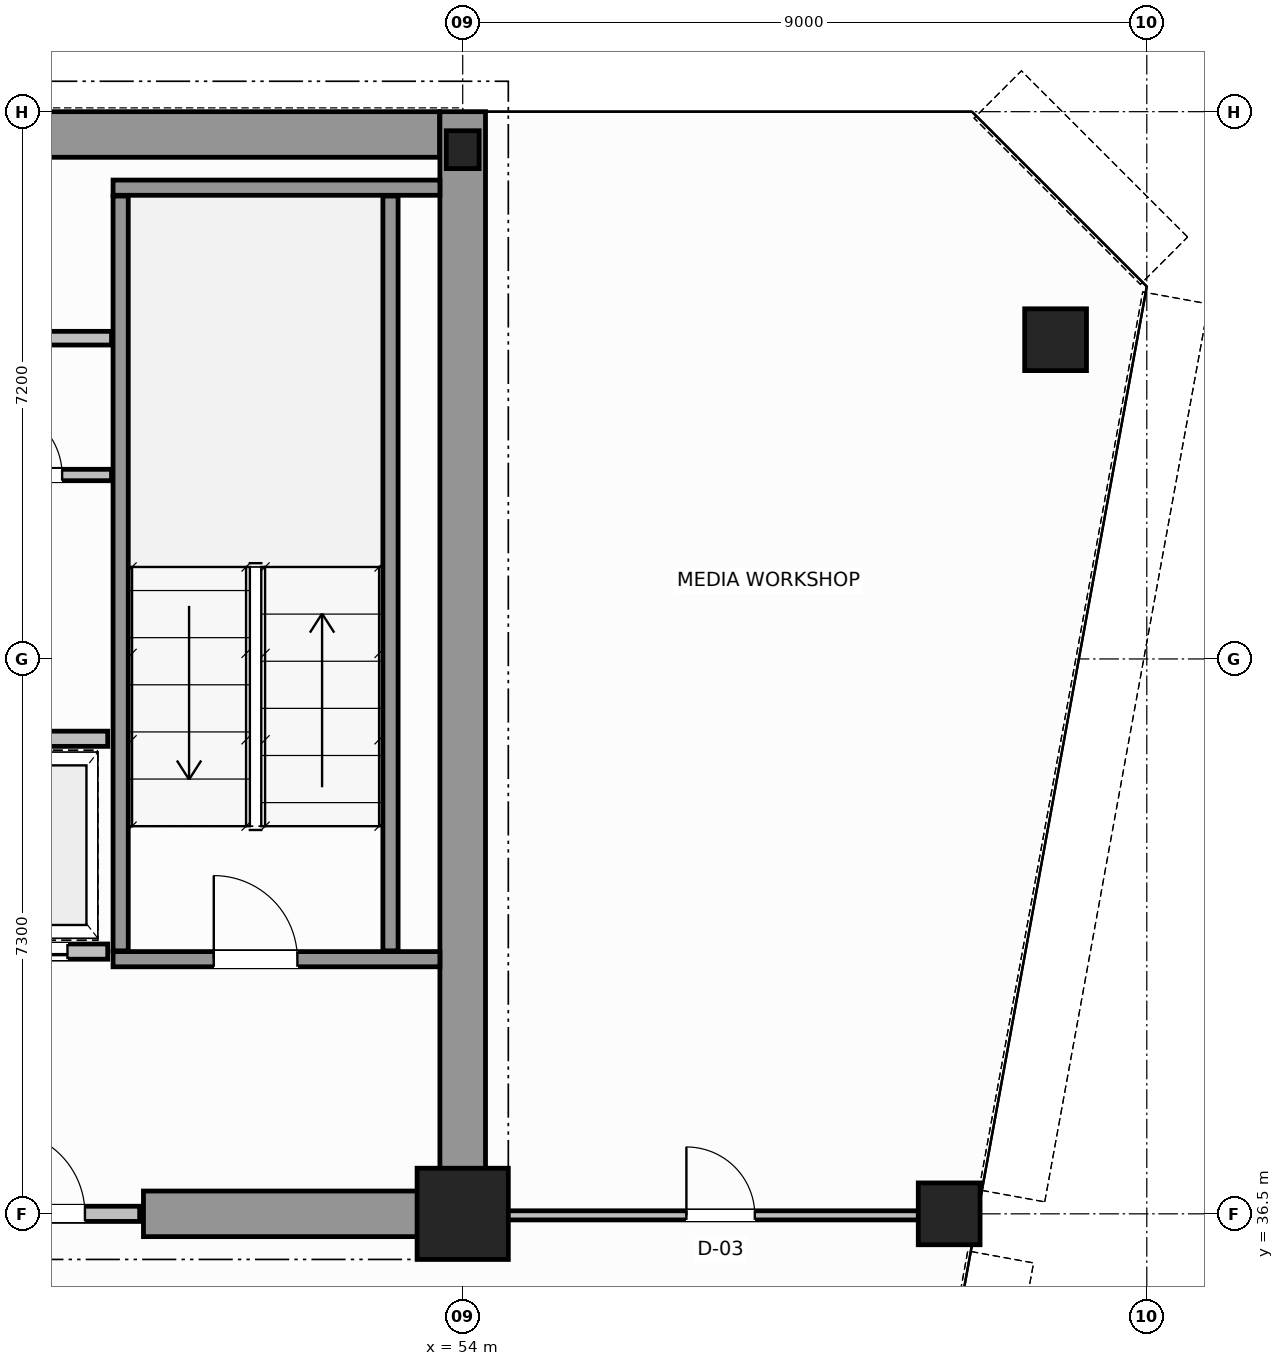
"""IFC4 building model, lengths in metres.
Left out: names, types, materials, properties, quantities, classifications, styles, units other than length and angle.
Written with IfcOpenShell. Run it as: python <this file> out.ifc"""

import sys

from ifc_helpers import new_model, si_unit, direction, frame, frame_2d, origin, origin_2d, place, context, subcontext, project, spatial, rectangle, hollow_circle, i_section, extrude, source, transform, mapped, element, fill, save


model = new_model("IFC4")
c1 = context("Model", 3, precision=1e-05, world=origin(), true_north=direction((0.0, 1.0)))
c2 = subcontext(c1, "Body", "Model", "MODEL_VIEW")
j1 = project(units=[si_unit("LENGTHUNIT", "METRE"), si_unit("PLANEANGLEUNIT", "RADIAN")], contexts=[c1])
p1 = place(None, origin())
s1 = spatial("IfcSite", under=j1, at=p1, CompositionType="ELEMENT")
p2 = place(p1, origin())
s2 = spatial("IfcBuilding", under=s1, at=p2, CompositionType="ELEMENT")
p3 = place(p2, frame((0.0, 0.0, 172.8)))
s3 = spatial("IfcBuildingStorey", under=s2, at=p3, CompositionType="ELEMENT", Elevation=172.8)
m1 = source(origin(), c2, "Body", "SweptSolid", [
    extrude(rectangle(XDim=1.2, YDim=1.2, at=origin_2d()), origin(), (0.0, 0.0, 1.0), 3.8),
])
p4 = place(p3, frame((54.0, 36.5, 0.0), z_axis=(0.0, 0.0, 1.0), x_axis=(1.0, 0.0, 0.0)))
e1 = element("IfcColumn", 1, at=p4, inside=s3, PredefinedType="COLUMN", context=c2, shape_type="MappedRepresentation", body=[
    mapped(m1, transform((0.0, 0.0, 0.0), scale=1.0)),
])
m2 = source(origin(), c2, "Body", "SweptSolid", [
    extrude(i_section(OverallWidth=0.432, OverallDepth=0.498, WebThickness=0.055, FlangeThickness=0.068, FilletRadius=0.015, at=origin_2d()), origin(), (0.0, 0.0, 1.0), 3.8),
])
p5 = place(p3, frame((54.0, 50.5, 0.0), z_axis=(0.0, 0.0, 1.0), x_axis=(1.0, 0.0, 0.0)))
e2 = element("IfcColumn", 2, at=p5, inside=s3, PredefinedType="COLUMN", context=c2, shape_type="MappedRepresentation", body=[
    mapped(m2, transform((0.0, 0.0, 0.0), scale=1.0)),
])
m3 = source(origin(), c2, "Body", "SweptSolid", [
    extrude(hollow_circle(Radius=0.406, WallThickness=0.04, at=origin_2d()), origin(), (0.0, 0.0, 1.0), 3.8),
])
for number, where, z_axis, x_axis in (
    (3, (61.8, 48.0, 0.0), (0.0, 0.0, 1.0), (1.0, 0.0, 0.0)),
    (4, (60.4, 36.5, 0.0), (0.0, 0.0, 1.0), (1.0, 0.0, 0.0)),
):
    element("IfcColumn", number, at=place(p3, frame(where, z_axis=z_axis, x_axis=x_axis)), inside=s3, PredefinedType="COLUMN", context=c2, shape_type="MappedRepresentation", body=[
        mapped(m3, transform((0.0, 0.0, 0.0), scale=1.0)),
    ])
p6 = place(p3, frame((34.002, 50.7, 0.0), z_axis=(0.0, 0.0, 1.0), x_axis=(1.0, 0.0, 0.0)))
e5 = element("IfcWall", 5, at=p6, inside=s3, PredefinedType="SHEAR", context=c2, shape_type="SweptSolid", body=[
    extrude(rectangle(XDim=19.694, YDim=0.6, at=frame_2d((9.847, 0.0))), origin(), (0.0, 0.0, 1.0), 3.8),
])
p7 = place(p3, frame((54.0, 36.5, 0.0), z_axis=(0.0, 0.0, 1.0), x_axis=(0.0, 1.0, 0.0)))
e6 = element("IfcWall", 6, at=p7, inside=s3, PredefinedType="SHEAR", context=c2, shape_type="SweptSolid", body=[
    extrude(rectangle(XDim=14.5, YDim=0.6, at=frame_2d((7.25, 0.0))), origin(), (0.0, 0.0, 1.0), 3.8),
])
p8 = place(p3, frame((49.8, 36.5, 0.0), z_axis=(0.0, 0.0, 1.0), x_axis=(1.0, 0.0, 0.0)))
e7 = element("IfcWall", 7, at=p8, inside=s3, PredefinedType="SHEAR", context=c2, shape_type="SweptSolid", body=[
    extrude(rectangle(XDim=3.88, YDim=0.6, at=frame_2d((1.94, 0.0))), origin(), (0.0, 0.0, 1.0), 2.58),
])
p9 = place(p3, frame((49.4, 39.85, 0.0), z_axis=(0.0, 0.0, 1.0), x_axis=(1.0, 0.0, 0.0)))
e8 = element("IfcWall", 8, at=p9, inside=s3, PredefinedType="SOLIDWALL", context=c2, shape_type="SweptSolid", body=[
    extrude(rectangle(XDim=4.3, YDim=0.2, at=frame_2d((2.15, 0.0))), origin(), (0.0, 0.0, 1.0), 3.8),
])
p10 = place(p9, frame((1.325, 0.0, 0.0)))
e9 = element("IfcOpeningElement", 9, at=p10, cuts=e8, PredefinedType="OPENING", context=c2, shape_type="SweptSolid", body=[
    extrude(rectangle(XDim=1.1, YDim=2.15, at=frame_2d((0.55, 1.075))), frame((0.0, 0.11, 0.0), z_axis=(0.0, -1.0, 0.0), x_axis=(1.0, 0.0, 0.0)), (0.0, 0.0, 1.0), 0.22),
])
p11 = place(p3, frame((49.4, 50.0, 0.0), z_axis=(0.0, 0.0, 1.0), x_axis=(1.0, 0.0, 0.0)))
e10 = element("IfcWall", 10, at=p11, inside=s3, PredefinedType="SOLIDWALL", context=c2, shape_type="SweptSolid", body=[
    extrude(rectangle(XDim=4.3, YDim=0.2, at=frame_2d((2.15, 0.0))), origin(), (0.0, 0.0, 1.0), 3.8),
])
for number, where, z_axis, x_axis in (
    (11, (49.5, 39.96, 0.0), (0.0, 0.0, 1.0), (0.0, 1.0, 0.0)),
    (12, (53.05, 39.96, 0.0), (0.0, 0.0, 1.0), (0.0, 1.0, 0.0)),
):
    element("IfcWall", number, at=place(p3, frame(where, z_axis=z_axis, x_axis=x_axis)), inside=s3, PredefinedType="SOLIDWALL", context=c2, shape_type="SweptSolid", body=[
        extrude(rectangle(XDim=9.93, YDim=0.2, at=frame_2d((4.965, 0.0))), origin(), (0.0, 0.0, 1.0), 3.8),
    ])
p12 = place(p3, frame((47.28, 36.5, 0.0), z_axis=(0.0, 0.0, 1.0), x_axis=(1.0, 0.0, 0.0)))
e13 = element("IfcWall", 13, at=p12, inside=s3, PredefinedType="SOLIDWALL", context=c2, shape_type="SweptSolid", body=[
    extrude(rectangle(XDim=2.47, YDim=0.2, at=frame_2d((1.235, 0.0))), origin(), (0.0, 0.0, 1.0), 2.57),
])
p13 = place(p12, frame((0.65, 0.0, 0.0)))
e14 = element("IfcOpeningElement", 14, at=p13, cuts=e13, PredefinedType="OPENING", context=c2, shape_type="SweptSolid", body=[
    extrude(rectangle(XDim=1.1, YDim=2.15, at=frame_2d((0.55, 1.075))), frame((0.0, 0.11, 0.0), z_axis=(0.0, -1.0, 0.0), x_axis=(1.0, 0.0, 0.0)), (0.0, 0.0, 1.0), 0.22),
])
p14 = place(p3, frame((47.17, 39.95, 0.0), z_axis=(0.0, 0.0, 1.0), x_axis=(1.0, 0.0, 0.0)))
e15 = element("IfcWall", 15, at=p14, inside=s3, PredefinedType="SOLIDWALL", context=c2, shape_type="SweptSolid", body=[
    extrude(rectangle(XDim=2.16, YDim=0.2, at=frame_2d((1.08, 0.0))), origin(), (0.0, 0.0, 1.0), 3.58),
])
p15 = place(p14, frame((0.53, 0.0, 0.0)))
e16 = element("IfcOpeningElement", 16, at=p15, cuts=e15, PredefinedType="OPENING", context=c2, shape_type="SweptSolid", body=[
    extrude(rectangle(XDim=1.1, YDim=2.15, at=frame_2d((0.55, 1.075))), frame((0.0, 0.11, 0.0), z_axis=(0.0, -1.0, 0.0), x_axis=(1.0, 0.0, 0.0)), (0.0, 0.0, 1.0), 0.22),
])
p16 = place(p3, frame((47.17, 42.75, 0.0), z_axis=(0.0, 0.0, 1.0), x_axis=(1.0, 0.0, 0.0)))
e17 = element("IfcWall", 17, at=p16, inside=s3, PredefinedType="SOLIDWALL", context=c2, shape_type="SweptSolid", body=[
    extrude(rectangle(XDim=2.16, YDim=0.2, at=frame_2d((1.08, 0.0))), origin(), (0.0, 0.0, 1.0), 3.58),
])
p17 = place(p3, frame((47.28, 46.22, 0.0), z_axis=(0.0, 0.0, 1.0), x_axis=(1.0, 0.0, 0.0)))
e18 = element("IfcWall", 18, at=p17, inside=s3, PredefinedType="PARTITIONING", context=c2, shape_type="SweptSolid", body=[
    extrude(rectangle(XDim=2.1, YDim=0.15, at=frame_2d((1.05, 0.0))), origin(), (0.0, 0.0, 1.0), 3.58),
])
p18 = place(p17, frame((0.55, 0.0, 0.0)))
e19 = element("IfcOpeningElement", 19, at=p18, cuts=e18, PredefinedType="OPENING", context=c2, shape_type="SweptSolid", body=[
    extrude(rectangle(XDim=0.9, YDim=2.1, at=frame_2d((0.45, 1.05))), frame((0.0, 0.085, 0.0), z_axis=(0.0, -1.0, 0.0), x_axis=(1.0, 0.0, 0.0)), (0.0, 0.0, 1.0), 0.17),
])
p19 = place(p3, frame((18.62, 48.02, 0.0), z_axis=(0.0, 0.0, 1.0), x_axis=(1.0, 0.0, 0.0)))
e20 = element("IfcWall", 20, at=p19, inside=s3, PredefinedType="PLUMBINGWALL", context=c2, shape_type="SweptSolid", body=[
    extrude(rectangle(XDim=30.76, YDim=0.18, at=frame_2d((15.38, 0.0))), origin(), (0.0, 0.0, 1.0), 3.58),
])
p20 = place(p19, frame((1.655, 0.0, 0.0)))
e21 = element("IfcOpeningElement", 21, at=p20, cuts=e20, PredefinedType="OPENING", context=c2, shape_type="SweptSolid", body=[
    extrude(rectangle(XDim=0.9, YDim=2.15, at=frame_2d((0.45, 1.075))), frame((0.0, 0.1, 0.0), z_axis=(0.0, -1.0, 0.0), x_axis=(1.0, 0.0, 0.0)), (0.0, 0.0, 1.0), 0.2),
])
p21 = place(p19, frame((6.03, 0.0, 0.0)))
e22 = element("IfcOpeningElement", 22, at=p21, cuts=e20, PredefinedType="OPENING", context=c2, shape_type="SweptSolid", body=[
    extrude(rectangle(XDim=0.9, YDim=2.15, at=frame_2d((0.45, 1.075))), frame((0.0, 0.1, 0.0), z_axis=(0.0, -1.0, 0.0), x_axis=(1.0, 0.0, 0.0)), (0.0, 0.0, 1.0), 0.2),
])
p22 = place(p19, frame((10.93, 0.0, 0.0)))
e23 = element("IfcOpeningElement", 23, at=p22, cuts=e20, PredefinedType="OPENING", context=c2, shape_type="SweptSolid", body=[
    extrude(rectangle(XDim=0.9, YDim=2.15, at=frame_2d((0.45, 1.075))), frame((0.0, 0.1, 0.0), z_axis=(0.0, -1.0, 0.0), x_axis=(1.0, 0.0, 0.0)), (0.0, 0.0, 1.0), 0.2),
])
p23 = place(p19, frame((16.13, 0.0, 0.0)))
e24 = element("IfcOpeningElement", 24, at=p23, cuts=e20, PredefinedType="OPENING", context=c2, shape_type="SweptSolid", body=[
    extrude(rectangle(XDim=0.9, YDim=2.15, at=frame_2d((0.45, 1.075))), frame((0.0, 0.1, 0.0), z_axis=(0.0, -1.0, 0.0), x_axis=(1.0, 0.0, 0.0)), (0.0, 0.0, 1.0), 0.2),
])
p24 = place(p19, frame((21.73, 0.0, 0.0)))
e25 = element("IfcOpeningElement", 25, at=p24, cuts=e20, PredefinedType="OPENING", context=c2, shape_type="SweptSolid", body=[
    extrude(rectangle(XDim=0.9, YDim=2.15, at=frame_2d((0.45, 1.075))), frame((0.0, 0.1, 0.0), z_axis=(0.0, -1.0, 0.0), x_axis=(1.0, 0.0, 0.0)), (0.0, 0.0, 1.0), 0.2),
])
p25 = place(p19, frame((27.505, 0.0, 0.0)))
e26 = element("IfcOpeningElement", 26, at=p25, cuts=e20, PredefinedType="OPENING", context=c2, shape_type="SweptSolid", body=[
    extrude(rectangle(XDim=0.9, YDim=2.15, at=frame_2d((0.45, 1.075))), frame((0.0, 0.1, 0.0), z_axis=(0.0, -1.0, 0.0), x_axis=(1.0, 0.0, 0.0)), (0.0, 0.0, 1.0), 0.2),
])
p26 = place(p3, frame((54.06, 36.48, 0.0), z_axis=(0.0, 0.0, 1.0), x_axis=(1.0, 0.0, 0.0)))
e27 = element("IfcWall", 27, at=p26, inside=s3, PredefinedType="PARTITIONING", context=c2, shape_type="SweptSolid", body=[
    extrude(rectangle(XDim=6.666, YDim=0.12, at=frame_2d((3.333, 0.0))), origin(), (0.0, 0.0, 1.0), 2.97),
])
p27 = place(p26, frame((2.883, 0.0, 0.0)))
e28 = element("IfcOpeningElement", 28, at=p27, cuts=e27, PredefinedType="OPENING", context=c2, shape_type="SweptSolid", body=[
    extrude(rectangle(XDim=0.9, YDim=2.15, at=frame_2d((0.45, 1.075))), frame((0.0, 0.07, 0.0), z_axis=(0.0, -1.0, 0.0), x_axis=(1.0, 0.0, 0.0)), (0.0, 0.0, 1.0), 0.14),
])
m4 = source(origin(), c2, "Body", "SweptSolid", [
    extrude(rectangle(XDim=1.1, YDim=2.15, at=frame_2d((0.55, 1.075))), frame((0.0, 0.025, 0.0), z_axis=(0.0, -1.0, 0.0), x_axis=(1.0, 0.0, 0.0)), (0.0, 0.0, 1.0), 0.05),
])
p28 = place(p10, origin())
e29 = element("IfcDoor", 29, at=p28, inside=s3, OperationType="SINGLE_SWING_RIGHT", PredefinedType="DOOR", context=c2, shape_type="MappedRepresentation", body=[
    mapped(m4, transform((0.0, 0.0, 0.0), scale=1.0)),
])
fill(e9, e29)
p29 = place(p13, origin())
e30 = element("IfcDoor", 30, at=p29, inside=s3, OperationType="SINGLE_SWING_LEFT", PredefinedType="DOOR", context=c2, shape_type="MappedRepresentation", body=[
    mapped(m4, transform((0.0, 0.0, 0.0), scale=1.0)),
])
fill(e14, e30)
p30 = place(p15, origin())
e31 = element("IfcDoor", 31, at=p30, inside=s3, OperationType="DOUBLE_DOOR_SLIDING", PredefinedType="DOOR", context=c2, shape_type="MappedRepresentation", body=[
    mapped(m4, transform((0.0, 0.0, 0.0), scale=1.0)),
])
fill(e16, e31)
m5 = source(origin(), c2, "Body", "SweptSolid", [
    extrude(rectangle(XDim=0.9, YDim=2.1, at=frame_2d((0.45, 1.05))), frame((0.0, 0.025, 0.0), z_axis=(0.0, -1.0, 0.0), x_axis=(1.0, 0.0, 0.0)), (0.0, 0.0, 1.0), 0.05),
])
p31 = place(p18, origin())
e32 = element("IfcDoor", 32, at=p31, inside=s3, OperationType="SINGLE_SWING_RIGHT", PredefinedType="DOOR", context=c2, shape_type="MappedRepresentation", body=[
    mapped(m5, transform((0.0, 0.0, 0.0), scale=1.0)),
])
fill(e19, e32)
m6 = source(origin(), c2, "Body", "SweptSolid", [
    extrude(rectangle(XDim=0.9, YDim=2.15, at=frame_2d((0.45, 1.075))), frame((0.0, 0.025, 0.0), z_axis=(0.0, -1.0, 0.0), x_axis=(1.0, 0.0, 0.0)), (0.0, 0.0, 1.0), 0.05),
])
p32 = place(p27, origin())
e33 = element("IfcDoor", 33, at=p32, inside=s3, OperationType="SINGLE_SWING_RIGHT", PredefinedType="DOOR", context=c2, shape_type="MappedRepresentation", body=[
    mapped(m6, transform((0.0, 0.0, 0.0), scale=1.0)),
])
fill(e28, e33)
save(model, sys.argv[1])
